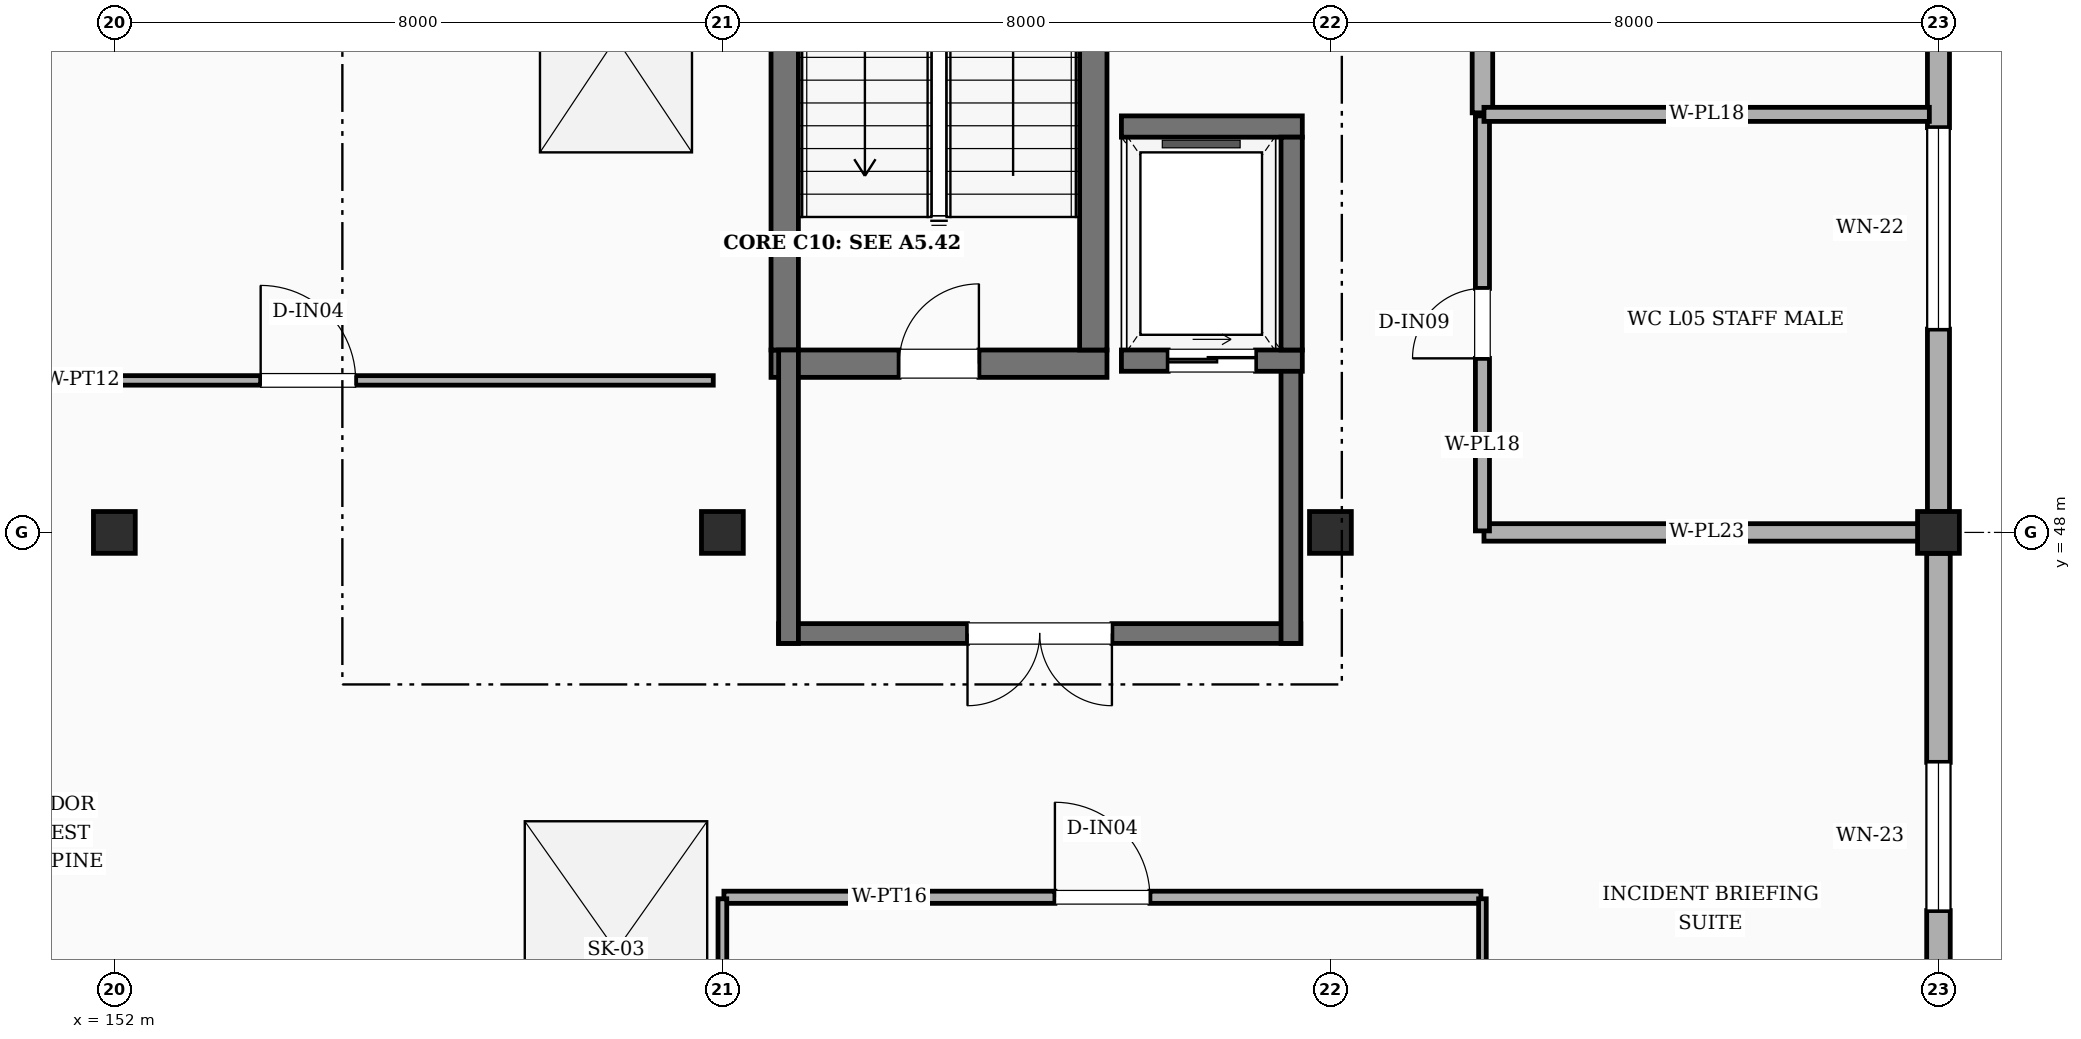
"""IFC4 building model, lengths in metres.
Left out: names, types, materials, properties, quantities, classifications, styles, units other than length and angle.
Written with IfcOpenShell. Run it as: python <this file> out.ifc"""

import sys

from ifc_helpers import new_model, si_unit, direction, frame, frame_2d, origin, origin_2d, place, context, subcontext, project, spatial, rectangle, extrude, element, fill, save


model = new_model("IFC4")
c1 = context("Model", 3, precision=1e-05, world=origin(), true_north=direction((0.0, 1.0)))
c2 = subcontext(c1, "Body", "Model", "MODEL_VIEW")
j1 = project(units=[si_unit("LENGTHUNIT", "METRE"), si_unit("PLANEANGLEUNIT", "RADIAN")], contexts=[c1])
p1 = place(None, origin())
s1 = spatial("IfcSite", under=j1, at=p1, CompositionType="ELEMENT")
p2 = place(p1, origin())
s2 = spatial("IfcBuilding", under=s1, at=p2, CompositionType="ELEMENT")
p3 = place(p2, frame((0.0, 0.0, 23.4)))
s3 = spatial("IfcBuildingStorey", under=s2, at=p3, CompositionType="ELEMENT", Elevation=23.4)
for number, where, z_axis, x_axis in (
    (1, (152.0, 48.0, 0.0), (0.0, 0.0, 1.0), (1.0, 0.0, 0.0)),
    (2, (160.0, 48.0, 0.0), (0.0, 0.0, 1.0), (1.0, 0.0, 0.0)),
    (3, (168.0, 48.0, 0.0), (0.0, 0.0, 1.0), (1.0, 0.0, 0.0)),
    (4, (176.0, 48.0, 0.0), (0.0, 0.0, 1.0), (1.0, 0.0, 0.0)),
):
    element("IfcColumn", number, at=place(p3, frame(where, z_axis=z_axis, x_axis=x_axis)), inside=s3, PredefinedType="COLUMN", context=c2, shape_type="SweptSolid", body=[
        extrude(rectangle(XDim=0.55, YDim=0.55, at=origin_2d()), origin(), (0.0, 0.0, 1.0), 4.2),
    ])
p4 = place(p3, frame((176.0, 40.275, 0.0), z_axis=(0.0, 0.0, 1.0), x_axis=(0.0, 1.0, 0.0)))
e5 = element("IfcWall", 5, at=p4, inside=s3, PredefinedType="STANDARD", context=c2, shape_type="SweptSolid", body=[
    extrude(rectangle(XDim=7.45, YDim=0.31, at=frame_2d((3.725, 0.0))), origin(), (0.0, 0.0, 1.0), 3.58),
])
p5 = place(p4, frame((2.75, 0.0, 0.95)))
e6 = element("IfcOpeningElement", 6, at=p5, cuts=e5, PredefinedType="OPENING", context=c2, shape_type="SweptSolid", body=[
    extrude(rectangle(XDim=1.95, YDim=1.95, at=frame_2d((0.975, 0.975))), frame((0.0, 0.165, 0.0), z_axis=(0.0, -1.0, 0.0), x_axis=(1.0, 0.0, 0.0)), (0.0, 0.0, 1.0), 0.33),
])
p6 = place(p3, frame((176.0, 48.275, 0.0), z_axis=(0.0, 0.0, 1.0), x_axis=(0.0, 1.0, 0.0)))
e7 = element("IfcWall", 7, at=p6, inside=s3, PredefinedType="STANDARD", context=c2, shape_type="SweptSolid", body=[
    extrude(rectangle(XDim=7.45, YDim=0.29, at=frame_2d((3.725, 0.0))), origin(), (0.0, 0.0, 1.0), 3.58),
])
p7 = place(p6, frame((2.4, 0.0, 0.95)))
e8 = element("IfcOpeningElement", 8, at=p7, cuts=e7, PredefinedType="OPENING", context=c2, shape_type="SweptSolid", body=[
    extrude(rectangle(XDim=2.65, YDim=1.95, at=frame_2d((1.325, 0.975))), frame((0.0, 0.155, 0.0), z_axis=(0.0, -1.0, 0.0), x_axis=(1.0, 0.0, 0.0)), (0.0, 0.0, 1.0), 0.31),
])
p8 = place(p3, frame((160.64, 50.22, 0.0), z_axis=(0.0, 0.0, 1.0), x_axis=(1.0, 0.0, 0.0)))
e9 = element("IfcWall", 9, at=p8, inside=s3, PredefinedType="SHEAR", context=c2, shape_type="SweptSolid", body=[
    extrude(rectangle(XDim=4.42, YDim=0.36, at=frame_2d((2.21, 0.0))), origin(), (0.0, 0.0, 1.0), 4.2),
])
p9 = place(p8, frame((1.685, 0.0, 0.0)))
e10 = element("IfcOpeningElement", 10, at=p9, cuts=e9, PredefinedType="OPENING", context=c2, shape_type="SweptSolid", body=[
    extrude(rectangle(XDim=1.05, YDim=2.15, at=frame_2d((0.525, 1.075))), frame((0.0, 0.19, 0.0), z_axis=(0.0, -1.0, 0.0), x_axis=(1.0, 0.0, 0.0)), (0.0, 0.0, 1.0), 0.38),
])
for number, where, z_axis, x_axis in (
    (11, (160.82, 50.4, 0.0), (0.0, 0.0, 1.0), (0.0, 1.0, 0.0)),
    (12, (164.88, 50.4, 0.0), (0.0, 0.0, 1.0), (0.0, 1.0, 0.0)),
):
    element("IfcWall", number, at=place(p3, frame(where, z_axis=z_axis, x_axis=x_axis)), inside=s3, PredefinedType="SHEAR", context=c2, shape_type="SweptSolid", body=[
        extrude(rectangle(XDim=8.6, YDim=0.36, at=frame_2d((4.3, 0.0))), origin(), (0.0, 0.0, 1.0), 4.2),
    ])
p10 = place(p3, frame((167.61, 46.67, 0.0), z_axis=(0.0, 0.0, 1.0), x_axis=(-1.0, 0.0, 0.0)))
e13 = element("IfcWall", 13, at=p10, inside=s3, PredefinedType="SHEAR", context=c2, shape_type="SweptSolid", body=[
    extrude(rectangle(XDim=6.87, YDim=0.26, at=frame_2d((3.435, 0.0))), origin(), (0.0, 0.0, 1.0), 4.2),
])
p11 = place(p10, frame((2.485, 0.0, 0.0)))
e14 = element("IfcOpeningElement", 14, at=p11, cuts=e13, PredefinedType="OPENING", context=c2, shape_type="SweptSolid", body=[
    extrude(rectangle(XDim=1.9, YDim=2.25, at=frame_2d((0.95, 1.125))), frame((0.0, 0.14, 0.0), z_axis=(0.0, -1.0, 0.0), x_axis=(1.0, 0.0, 0.0)), (0.0, 0.0, 1.0), 0.28),
])
for number, where, z_axis, x_axis in (
    (15, (160.87, 46.54, 0.0), (0.0, 0.0, 1.0), (0.0, 1.0, 0.0)),
    (16, (167.48, 46.54, 0.0), (0.0, 0.0, 1.0), (0.0, 1.0, 0.0)),
):
    element("IfcWall", number, at=place(p3, frame(where, z_axis=z_axis, x_axis=x_axis)), inside=s3, PredefinedType="SHEAR", context=c2, shape_type="SweptSolid", body=[
        extrude(rectangle(XDim=3.86, YDim=0.26, at=frame_2d((1.93, 0.0))), origin(), (0.0, 0.0, 1.0), 4.2),
    ])
p12 = place(p3, frame((165.25, 50.26, 0.0), z_axis=(0.0, 0.0, 1.0), x_axis=(1.0, 0.0, 0.0)))
e17 = element("IfcWall", 17, at=p12, inside=s3, PredefinedType="SHEAR", context=c2, shape_type="SweptSolid", body=[
    extrude(rectangle(XDim=2.38, YDim=0.28, at=frame_2d((1.19, 0.0))), origin(), (0.0, 0.0, 1.0), 4.2),
])
p13 = place(p12, frame((0.615, 0.0, 0.0)))
e18 = element("IfcOpeningElement", 18, at=p13, cuts=e17, PredefinedType="OPENING", context=c2, shape_type="SweptSolid", body=[
    extrude(rectangle(XDim=1.15, YDim=2.2, at=frame_2d((0.575, 1.1))), frame((0.0, 0.15, 0.0), z_axis=(0.0, -1.0, 0.0), x_axis=(1.0, 0.0, 0.0)), (0.0, 0.0, 1.0), 0.3),
])
p14 = place(p3, frame((165.25, 53.34, 0.0), z_axis=(0.0, 0.0, 1.0), x_axis=(1.0, 0.0, 0.0)))
e19 = element("IfcWall", 19, at=p14, inside=s3, PredefinedType="SHEAR", context=c2, shape_type="SweptSolid", body=[
    extrude(rectangle(XDim=2.38, YDim=0.28, at=frame_2d((1.19, 0.0))), origin(), (0.0, 0.0, 1.0), 4.2),
])
p15 = place(p3, frame((167.49, 50.4, 0.0), z_axis=(0.0, 0.0, 1.0), x_axis=(0.0, 1.0, 0.0)))
e20 = element("IfcWall", 20, at=p15, inside=s3, PredefinedType="SHEAR", context=c2, shape_type="SweptSolid", body=[
    extrude(rectangle(XDim=2.8, YDim=0.28, at=frame_2d((1.4, 0.0))), origin(), (0.0, 0.0, 1.0), 4.2),
])
p16 = place(p3, frame((160.02, 43.2, 0.0), z_axis=(0.0, 0.0, 1.0), x_axis=(1.0, 0.0, 0.0)))
e21 = element("IfcWall", 21, at=p16, inside=s3, PredefinedType="PARTITIONING", context=c2, shape_type="SweptSolid", body=[
    extrude(rectangle(XDim=9.96, YDim=0.16, at=frame_2d((4.98, 0.0))), origin(), (0.0, 0.0, 1.0), 3.58),
])
p17 = place(p16, frame((4.355, 0.0, 0.0)))
e22 = element("IfcOpeningElement", 22, at=p17, cuts=e21, PredefinedType="OPENING", context=c2, shape_type="SweptSolid", body=[
    extrude(rectangle(XDim=1.25, YDim=2.15, at=frame_2d((0.625, 1.075))), frame((0.0, 0.09, 0.0), z_axis=(0.0, -1.0, 0.0), x_axis=(1.0, 0.0, 0.0)), (0.0, 0.0, 1.0), 0.18),
])
p18 = place(p3, frame((149.22, 50.0, 0.0), z_axis=(0.0, 0.0, 1.0), x_axis=(1.0, 0.0, 0.0)))
e23 = element("IfcWall", 23, at=p18, inside=s3, PredefinedType="PARTITIONING", context=c2, shape_type="SweptSolid", body=[
    extrude(rectangle(XDim=10.66, YDim=0.125, at=frame_2d((5.33, 0.0))), origin(), (0.0, 0.0, 1.0), 3.58),
])
p19 = place(p18, frame((4.705, 0.0, 0.0)))
e24 = element("IfcOpeningElement", 24, at=p19, cuts=e23, PredefinedType="OPENING", context=c2, shape_type="SweptSolid", body=[
    extrude(rectangle(XDim=1.25, YDim=2.15, at=frame_2d((0.625, 1.075))), frame((0.0, 0.073, 0.0), z_axis=(0.0, -1.0, 0.0), x_axis=(1.0, 0.0, 0.0)), (0.0, 0.0, 1.0), 0.145),
])
p20 = place(p3, frame((160.0, 24.12, 0.0), z_axis=(0.0, 0.0, 1.0), x_axis=(0.0, 1.0, 0.0)))
e25 = element("IfcWall", 25, at=p20, inside=s3, PredefinedType="PARTITIONING", context=c2, shape_type="SweptSolid", body=[
    extrude(rectangle(XDim=19.06, YDim=0.115, at=frame_2d((9.53, 0.0))), origin(), (0.0, 0.0, 1.0), 3.58),
])
p21 = place(p3, frame((170.0, 24.12, 0.0), z_axis=(0.0, 0.0, 1.0), x_axis=(0.0, 1.0, 0.0)))
e26 = element("IfcWall", 26, at=p21, inside=s3, PredefinedType="PARTITIONING", context=c2, shape_type="SweptSolid", body=[
    extrude(rectangle(XDim=19.06, YDim=0.1, at=frame_2d((9.53, 0.0))), origin(), (0.0, 0.0, 1.0), 3.429),
])
p22 = place(p21, frame((8.905, 0.0, 0.0)))
e27 = element("IfcOpeningElement", 27, at=p22, cuts=e26, PredefinedType="OPENING", context=c2, shape_type="SweptSolid", body=[
    extrude(rectangle(XDim=1.25, YDim=2.15, at=frame_2d((0.625, 1.075))), frame((0.0, 0.06, 0.0), z_axis=(0.0, -1.0, 0.0), x_axis=(1.0, 0.0, 0.0)), (0.0, 0.0, 1.0), 0.12),
])
p23 = place(p3, frame((170.02, 48.0, 0.0), z_axis=(0.0, 0.0, 1.0), x_axis=(1.0, 0.0, 0.0)))
e28 = element("IfcWall", 28, at=p23, inside=s3, PredefinedType="PLUMBINGWALL", context=c2, shape_type="SweptSolid", body=[
    extrude(rectangle(XDim=5.86, YDim=0.23, at=frame_2d((2.93, 0.0))), origin(), (0.0, 0.0, 1.0), 3.429),
])
p24 = place(p3, frame((170.0, 48.02, 0.0), z_axis=(0.0, 0.0, 1.0), x_axis=(0.0, 1.0, 0.0)))
e29 = element("IfcWall", 29, at=p24, inside=s3, PredefinedType="PLUMBINGWALL", context=c2, shape_type="SweptSolid", body=[
    extrude(rectangle(XDim=5.46, YDim=0.185, at=frame_2d((2.73, 0.0))), origin(), (0.0, 0.0, 1.0), 3.429),
])
p25 = place(p24, frame((2.27, 0.0, 0.0)))
e30 = element("IfcOpeningElement", 30, at=p25, cuts=e29, PredefinedType="OPENING", context=c2, shape_type="SweptSolid", body=[
    extrude(rectangle(XDim=0.92, YDim=2.1, at=frame_2d((0.46, 1.05))), frame((0.0, 0.103, 0.0), z_axis=(0.0, -1.0, 0.0), x_axis=(1.0, 0.0, 0.0)), (0.0, 0.0, 1.0), 0.205),
])
p26 = place(p3, frame((170.0, 53.52, 0.0), z_axis=(0.0, 0.0, 1.0), x_axis=(0.0, 1.0, 0.0)))
e31 = element("IfcWall", 31, at=p26, inside=s3, PredefinedType="PLUMBINGWALL", context=c2, shape_type="SweptSolid", body=[
    extrude(rectangle(XDim=5.46, YDim=0.27, at=frame_2d((2.73, 0.0))), origin(), (0.0, 0.0, 1.0), 3.97),
])
p27 = place(p26, frame((2.27, 0.0, 0.0)))
e32 = element("IfcOpeningElement", 32, at=p27, cuts=e31, PredefinedType="OPENING", context=c2, shape_type="SweptSolid", body=[
    extrude(rectangle(XDim=0.92, YDim=2.1, at=frame_2d((0.46, 1.05))), frame((0.0, 0.145, 0.0), z_axis=(0.0, -1.0, 0.0), x_axis=(1.0, 0.0, 0.0)), (0.0, 0.0, 1.0), 0.29),
])
p28 = place(p3, frame((170.02, 53.5, 0.0), z_axis=(0.0, 0.0, 1.0), x_axis=(1.0, 0.0, 0.0)))
e33 = element("IfcWall", 33, at=p28, inside=s3, PredefinedType="PLUMBINGWALL", context=c2, shape_type="SweptSolid", body=[
    extrude(rectangle(XDim=5.86, YDim=0.185, at=frame_2d((2.93, 0.0))), origin(), (0.0, 0.0, 1.0), 3.58),
])
p29 = place(p5, origin())
e34 = element("IfcWindow", 34, at=p29, inside=s3, PartitioningType="SINGLE_PANEL", PredefinedType="WINDOW", context=c2, shape_type="SweptSolid", body=[
    extrude(rectangle(XDim=1.95, YDim=1.95, at=frame_2d((0.975, 0.975))), frame((0.0, 0.03, 0.0), z_axis=(0.0, -1.0, 0.0), x_axis=(1.0, 0.0, 0.0)), (0.0, 0.0, 1.0), 0.06),
])
fill(e6, e34)
p30 = place(p7, origin())
e35 = element("IfcWindow", 35, at=p30, inside=s3, PartitioningType="SINGLE_PANEL", PredefinedType="WINDOW", context=c2, shape_type="SweptSolid", body=[
    extrude(rectangle(XDim=2.65, YDim=1.95, at=frame_2d((1.325, 0.975))), frame((0.0, 0.03, 0.0), z_axis=(0.0, -1.0, 0.0), x_axis=(1.0, 0.0, 0.0)), (0.0, 0.0, 1.0), 0.06),
])
fill(e8, e35)
p31 = place(p2, frame((0.0, 0.0, 27.6)))
p32 = place(p31, frame((0.0, 0.0, 1.925)))
p33 = place(p32, frame((158.6, 42.5, 0.0)))
p34 = place(p33, frame((0.0, 0.0, 0.175)))
e36 = element("IfcWindow", 36, at=p34, inside=s3, PartitioningType="SINGLE_PANEL", PredefinedType="SKYLIGHT", context=c2, shape_type="SweptSolid", body=[
    extrude(rectangle(XDim=2.4, YDim=3.4, at=origin_2d()), origin(), (0.0, 0.0, 1.0), 0.05),
])
p35 = place(p32, frame((158.6, 54.5, 0.0)))
p36 = place(p35, frame((0.0, 0.0, 0.175)))
e37 = element("IfcWindow", 37, at=p36, inside=s3, PartitioningType="SINGLE_PANEL", PredefinedType="SKYLIGHT", context=c2, shape_type="SweptSolid", body=[
    extrude(rectangle(XDim=2.0, YDim=3.0, at=origin_2d()), origin(), (0.0, 0.0, 1.0), 0.05),
])
p37 = place(p9, origin())
e38 = element("IfcDoor", 38, at=p37, inside=s3, OperationType="SINGLE_SWING_RIGHT", PredefinedType="DOOR", context=c2, shape_type="SweptSolid", body=[
    extrude(rectangle(XDim=1.05, YDim=2.15, at=frame_2d((0.525, 1.075))), frame((0.0, 0.025, 0.0), z_axis=(0.0, -1.0, 0.0), x_axis=(1.0, 0.0, 0.0)), (0.0, 0.0, 1.0), 0.05),
])
fill(e10, e38)
p38 = place(p11, origin())
e39 = element("IfcDoor", 39, at=p38, inside=s3, OperationType="DOUBLE_DOOR_SINGLE_SWING", PredefinedType="DOOR", context=c2, shape_type="SweptSolid", body=[
    extrude(rectangle(XDim=1.9, YDim=2.25, at=frame_2d((0.95, 1.125))), frame((0.0, 0.025, 0.0), z_axis=(0.0, -1.0, 0.0), x_axis=(1.0, 0.0, 0.0)), (0.0, 0.0, 1.0), 0.05),
])
fill(e14, e39)
p39 = place(p13, origin())
e40 = element("IfcDoor", 40, at=p39, inside=s3, OperationType="SLIDING_TO_LEFT", PredefinedType="DOOR", context=c2, shape_type="SweptSolid", body=[
    extrude(rectangle(XDim=1.15, YDim=2.2, at=frame_2d((0.575, 1.1))), frame((0.0, 0.025, 0.0), z_axis=(0.0, -1.0, 0.0), x_axis=(1.0, 0.0, 0.0)), (0.0, 0.0, 1.0), 0.05),
])
fill(e18, e40)
p40 = place(p17, origin())
e41 = element("IfcDoor", 41, at=p40, inside=s3, OperationType="SINGLE_SWING_LEFT", PredefinedType="DOOR", context=c2, shape_type="SweptSolid", body=[
    extrude(rectangle(XDim=1.25, YDim=2.15, at=frame_2d((0.625, 1.075))), frame((0.0, 0.025, 0.0), z_axis=(0.0, -1.0, 0.0), x_axis=(1.0, 0.0, 0.0)), (0.0, 0.0, 1.0), 0.05),
])
fill(e22, e41)
p41 = place(p19, origin())
e42 = element("IfcDoor", 42, at=p41, inside=s3, OperationType="SINGLE_SWING_LEFT", PredefinedType="DOOR", context=c2, shape_type="SweptSolid", body=[
    extrude(rectangle(XDim=1.25, YDim=2.15, at=frame_2d((0.625, 1.075))), frame((0.0, 0.025, 0.0), z_axis=(0.0, -1.0, 0.0), x_axis=(1.0, 0.0, 0.0)), (0.0, 0.0, 1.0), 0.05),
])
fill(e24, e42)
p42 = place(p25, origin())
e43 = element("IfcDoor", 43, at=p42, inside=s3, OperationType="SINGLE_SWING_LEFT", PredefinedType="DOOR", context=c2, shape_type="SweptSolid", body=[
    extrude(rectangle(XDim=0.92, YDim=2.1, at=frame_2d((0.46, 1.05))), frame((0.0, 0.025, 0.0), z_axis=(0.0, -1.0, 0.0), x_axis=(1.0, 0.0, 0.0)), (0.0, 0.0, 1.0), 0.05),
])
fill(e30, e43)
save(model, sys.argv[1])
